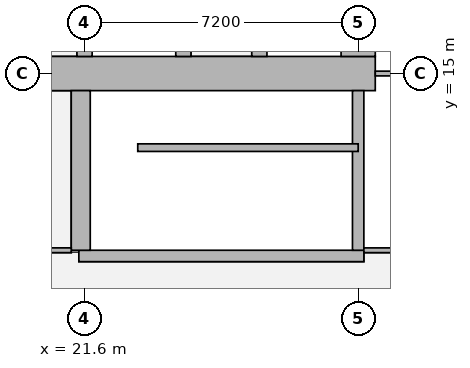
"""IFC4 building model, lengths in metres.
Left out: names, types, materials, properties, quantities, classifications, styles, units other than length and angle.
Written with IfcOpenShell. Run it as: python <this file> out.ifc"""

import sys

from ifc_helpers import new_model, si_unit, direction, frame, frame_2d, origin, place, context, subcontext, project, spatial, rectangle, extrude, element, fill, save


model = new_model("IFC4")
c1 = context("Model", 3, precision=1e-05, world=origin(), true_north=direction((0.0, 1.0)))
c2 = subcontext(c1, "Body", "Model", "MODEL_VIEW")
j1 = project(units=[si_unit("LENGTHUNIT", "METRE"), si_unit("PLANEANGLEUNIT", "RADIAN")], contexts=[c1])
p1 = place(None, origin())
s1 = spatial("IfcSite", under=j1, at=p1, CompositionType="ELEMENT")
p2 = place(p1, origin())
s2 = spatial("IfcBuilding", under=s1, at=p2, CompositionType="ELEMENT")
p3 = place(p2, frame((0.0, 0.0, 158.3)))
s3 = spatial("IfcBuildingStorey", under=s2, at=p3, CompositionType="ELEMENT", Elevation=158.3)
p4 = place(p3, frame((13.95, 15.0, 0.0), z_axis=(0.0, 0.0, 1.0), x_axis=(1.0, 0.0, 0.0)))
e1 = element("IfcWall", 1, at=p4, inside=s3, PredefinedType="SHEAR", context=c2, shape_type="SweptSolid", body=[
    extrude(rectangle(XDim=15.3, YDim=0.9, at=frame_2d((7.65, 0.0))), origin(), (0.0, 0.0, 1.0), 3.75),
])
p5 = place(p4, frame((4.45, 0.0, 0.0)))
e2 = element("IfcOpeningElement", 2, at=p5, cuts=e1, PredefinedType="OPENING", context=c2, shape_type="SweptSolid", body=[
    extrude(rectangle(XDim=1.8, YDim=2.1, at=frame_2d((0.9, 1.05))), frame((0.0, 0.46, 0.0), z_axis=(0.0, -1.0, 0.0), x_axis=(1.0, 0.0, 0.0)), (0.0, 0.0, 1.0), 0.92),
])
p6 = place(p4, frame((10.7, 0.0, 0.0)))
e3 = element("IfcOpeningElement", 3, at=p6, cuts=e1, PredefinedType="OPENING", context=c2, shape_type="SweptSolid", body=[
    extrude(rectangle(XDim=1.1, YDim=2.1, at=frame_2d((0.55, 1.05))), frame((0.0, 0.46, 0.0), z_axis=(0.0, -1.0, 0.0), x_axis=(1.0, 0.0, 0.0)), (0.0, 0.0, 1.0), 0.92),
])
p7 = place(p3, frame((28.8, 15.45, 0.0), z_axis=(0.0, 0.0, 1.0), x_axis=(0.0, 1.0, 0.0)))
e4 = element("IfcWall", 4, at=p7, inside=s3, PredefinedType="SHEAR", context=c2, shape_type="SweptSolid", body=[
    extrude(rectangle(XDim=14.1, YDim=0.9, at=frame_2d((7.05, 0.0))), origin(), (0.0, 0.0, 1.0), 3.75),
])
p8 = place(p3, frame((21.6, 15.45, 0.0), z_axis=(0.0, 0.0, 1.0), x_axis=(0.0, 1.0, 0.0)))
e5 = element("IfcWall", 5, at=p8, inside=s3, PredefinedType="SHEAR", context=c2, shape_type="SweptSolid", body=[
    extrude(rectangle(XDim=14.1, YDim=0.4, at=frame_2d((7.05, 0.0))), origin(), (0.0, 0.0, 1.0), 3.75),
])
p9 = place(p8, frame((0.875, 0.0, 0.0)))
e6 = element("IfcOpeningElement", 6, at=p9, cuts=e5, PredefinedType="OPENING", context=c2, shape_type="SweptSolid", body=[
    extrude(rectangle(XDim=1.1, YDim=2.1, at=frame_2d((0.55, 1.05))), frame((0.0, 0.21, 0.0), z_axis=(0.0, -1.0, 0.0), x_axis=(1.0, 0.0, 0.0)), (0.0, 0.0, 1.0), 0.42),
])
p10 = place(p8, frame((4.625, 0.0, 0.0)))
e7 = element("IfcOpeningElement", 7, at=p10, cuts=e5, PredefinedType="OPENING", context=c2, shape_type="SweptSolid", body=[
    extrude(rectangle(XDim=1.1, YDim=2.1, at=frame_2d((0.55, 1.05))), frame((0.0, 0.21, 0.0), z_axis=(0.0, -1.0, 0.0), x_axis=(1.0, 0.0, 0.0)), (0.0, 0.0, 1.0), 0.42),
])
p11 = place(p8, frame((8.375, 0.0, 0.0)))
e8 = element("IfcOpeningElement", 8, at=p11, cuts=e5, PredefinedType="OPENING", context=c2, shape_type="SweptSolid", body=[
    extrude(rectangle(XDim=1.1, YDim=2.1, at=frame_2d((0.55, 1.05))), frame((0.0, 0.21, 0.0), z_axis=(0.0, -1.0, 0.0), x_axis=(1.0, 0.0, 0.0)), (0.0, 0.0, 1.0), 0.42),
])
p12 = place(p8, frame((12.125, 0.0, 0.0)))
e9 = element("IfcOpeningElement", 9, at=p12, cuts=e5, PredefinedType="OPENING", context=c2, shape_type="SweptSolid", body=[
    extrude(rectangle(XDim=1.1, YDim=2.1, at=frame_2d((0.55, 1.05))), frame((0.0, 0.21, 0.0), z_axis=(0.0, -1.0, 0.0), x_axis=(1.0, 0.0, 0.0)), (0.0, 0.0, 1.0), 0.42),
])
p13 = place(p3, frame((24.2, 15.45, 0.0), z_axis=(0.0, 0.0, 1.0), x_axis=(0.0, 1.0, 0.0)))
e10 = element("IfcWall", 10, at=p13, inside=s3, PredefinedType="SHEAR", context=c2, shape_type="SweptSolid", body=[
    extrude(rectangle(XDim=14.1, YDim=0.4, at=frame_2d((7.05, 0.0))), origin(), (0.0, 0.0, 1.0), 3.75),
])
p14 = place(p3, frame((26.2, 15.45, 0.0), z_axis=(0.0, 0.0, 1.0), x_axis=(0.0, 1.0, 0.0)))
e11 = element("IfcWall", 11, at=p14, inside=s3, PredefinedType="SHEAR", context=c2, shape_type="SweptSolid", body=[
    extrude(rectangle(XDim=3.1, YDim=0.4, at=frame_2d((1.55, 0.0))), origin(), (0.0, 0.0, 1.0), 3.75),
])
p15 = place(p14, frame((0.825, 0.0, 0.0)))
e12 = element("IfcOpeningElement", 12, at=p15, cuts=e11, PredefinedType="OPENING", context=c2, shape_type="SweptSolid", body=[
    extrude(rectangle(XDim=1.2, YDim=2.1, at=frame_2d((0.6, 1.05))), frame((0.0, 0.21, 0.0), z_axis=(0.0, -1.0, 0.0), x_axis=(1.0, 0.0, 0.0)), (0.0, 0.0, 1.0), 0.42),
])
p16 = place(p3, frame((21.45, 10.2, 0.0), z_axis=(0.0, 0.0, 1.0), x_axis=(1.0, 0.0, 0.0)))
e13 = element("IfcWall", 13, at=p16, inside=s3, PredefinedType="SHEAR", context=c2, shape_type="SweptSolid", body=[
    extrude(rectangle(XDim=7.5, YDim=0.3, at=frame_2d((3.75, 0.0))), origin(), (0.0, 0.0, 1.0), 3.75),
])
p17 = place(p16, frame((0.5, 0.0, 0.0)))
e14 = element("IfcOpeningElement", 14, at=p17, cuts=e13, PredefinedType="OPENING", context=c2, shape_type="SweptSolid", body=[
    extrude(rectangle(XDim=1.1, YDim=2.1, at=frame_2d((0.55, 1.05))), frame((0.0, 0.16, 0.0), z_axis=(0.0, -1.0, 0.0), x_axis=(1.0, 0.0, 0.0)), (0.0, 0.0, 1.0), 0.32),
])
p18 = place(p3, frame((21.5, 10.35, 0.0), z_axis=(0.0, 0.0, 1.0), x_axis=(0.0, 1.0, 0.0)))
e15 = element("IfcWall", 15, at=p18, inside=s3, PredefinedType="SHEAR", context=c2, shape_type="SweptSolid", body=[
    extrude(rectangle(XDim=4.2, YDim=0.5, at=frame_2d((2.1, 0.0))), origin(), (0.0, 0.0, 1.0), 3.75),
])
p19 = place(p3, frame((28.8, 10.35, 0.0), z_axis=(0.0, 0.0, 1.0), x_axis=(0.0, 1.0, 0.0)))
e16 = element("IfcWall", 16, at=p19, inside=s3, PredefinedType="SHEAR", context=c2, shape_type="SweptSolid", body=[
    extrude(rectangle(XDim=4.2, YDim=0.3, at=frame_2d((2.1, 0.0))), origin(), (0.0, 0.0, 1.0), 3.75),
])
p20 = place(p3, frame((10.413, 10.35, 0.0), z_axis=(0.0, 0.0, 1.0), x_axis=(1.0, 0.0, 0.0)))
e17 = element("IfcWall", 17, at=p20, inside=s3, PredefinedType="PARTITIONING", context=c2, shape_type="SweptSolid", body=[
    extrude(rectangle(XDim=10.837, YDim=0.125, at=frame_2d((5.418, 0.0))), origin(), (0.0, 0.0, 1.0), 3.5),
])
p21 = place(p20, frame((7.582, 0.0, 0.0)))
e18 = element("IfcOpeningElement", 18, at=p21, cuts=e17, PredefinedType="OPENING", context=c2, shape_type="SweptSolid", body=[
    extrude(rectangle(XDim=1.8, YDim=2.1, at=frame_2d((0.9, 1.05))), frame((0.0, 0.073, 0.0), z_axis=(0.0, -1.0, 0.0), x_axis=(1.0, 0.0, 0.0)), (0.0, 0.0, 1.0), 0.145),
])
p22 = place(p3, frame((28.95, 10.35, 0.0), z_axis=(0.0, 0.0, 1.0), x_axis=(1.0, 0.0, 0.0)))
e19 = element("IfcWall", 19, at=p22, inside=s3, PredefinedType="PARTITIONING", context=c2, shape_type="SweptSolid", body=[
    extrude(rectangle(XDim=9.013, YDim=0.125, at=frame_2d((4.506, 0.0))), origin(), (0.0, 0.0, 1.0), 3.5),
])
p23 = place(p3, frame((29.25, 15.0, 0.0), z_axis=(0.0, 0.0, 1.0), x_axis=(1.0, 0.0, 0.0)))
e20 = element("IfcWall", 20, at=p23, inside=s3, PredefinedType="PARTITIONING", context=c2, shape_type="SweptSolid", body=[
    extrude(rectangle(XDim=5.176, YDim=0.125, at=frame_2d((2.588, 0.0))), origin(), (0.0, 0.0, 1.0), 3.5),
])
p24 = place(p3, frame((23.0, 13.05, 0.0), z_axis=(0.0, 0.0, 1.0), x_axis=(1.0, 0.0, 0.0)))
e21 = element("IfcWall", 21, at=p24, inside=s3, PredefinedType="SHEAR", context=c2, shape_type="SweptSolid", body=[
    extrude(rectangle(XDim=5.8, YDim=0.2, at=frame_2d((2.9, 0.0))), origin(), (0.0, 0.0, 1.0), 3.75),
])
p25 = place(p6, origin())
e22 = element("IfcDoor", 22, at=p25, inside=s3, OperationType="SINGLE_SWING_RIGHT", PredefinedType="DOOR", context=c2, shape_type="SweptSolid", body=[
    extrude(rectangle(XDim=1.1, YDim=2.1, at=frame_2d((0.55, 1.05))), frame((0.0, 0.025, 0.0), z_axis=(0.0, -1.0, 0.0), x_axis=(1.0, 0.0, 0.0)), (0.0, 0.0, 1.0), 0.05),
])
fill(e3, e22)
p26 = place(p17, origin())
e23 = element("IfcDoor", 23, at=p26, inside=s3, OperationType="SINGLE_SWING_LEFT", PredefinedType="DOOR", context=c2, shape_type="SweptSolid", body=[
    extrude(rectangle(XDim=1.1, YDim=2.1, at=frame_2d((0.55, 1.05))), frame((0.0, 0.025, 0.0), z_axis=(0.0, -1.0, 0.0), x_axis=(1.0, 0.0, 0.0)), (0.0, 0.0, 1.0), 0.05),
])
fill(e14, e23)
save(model, sys.argv[1])
